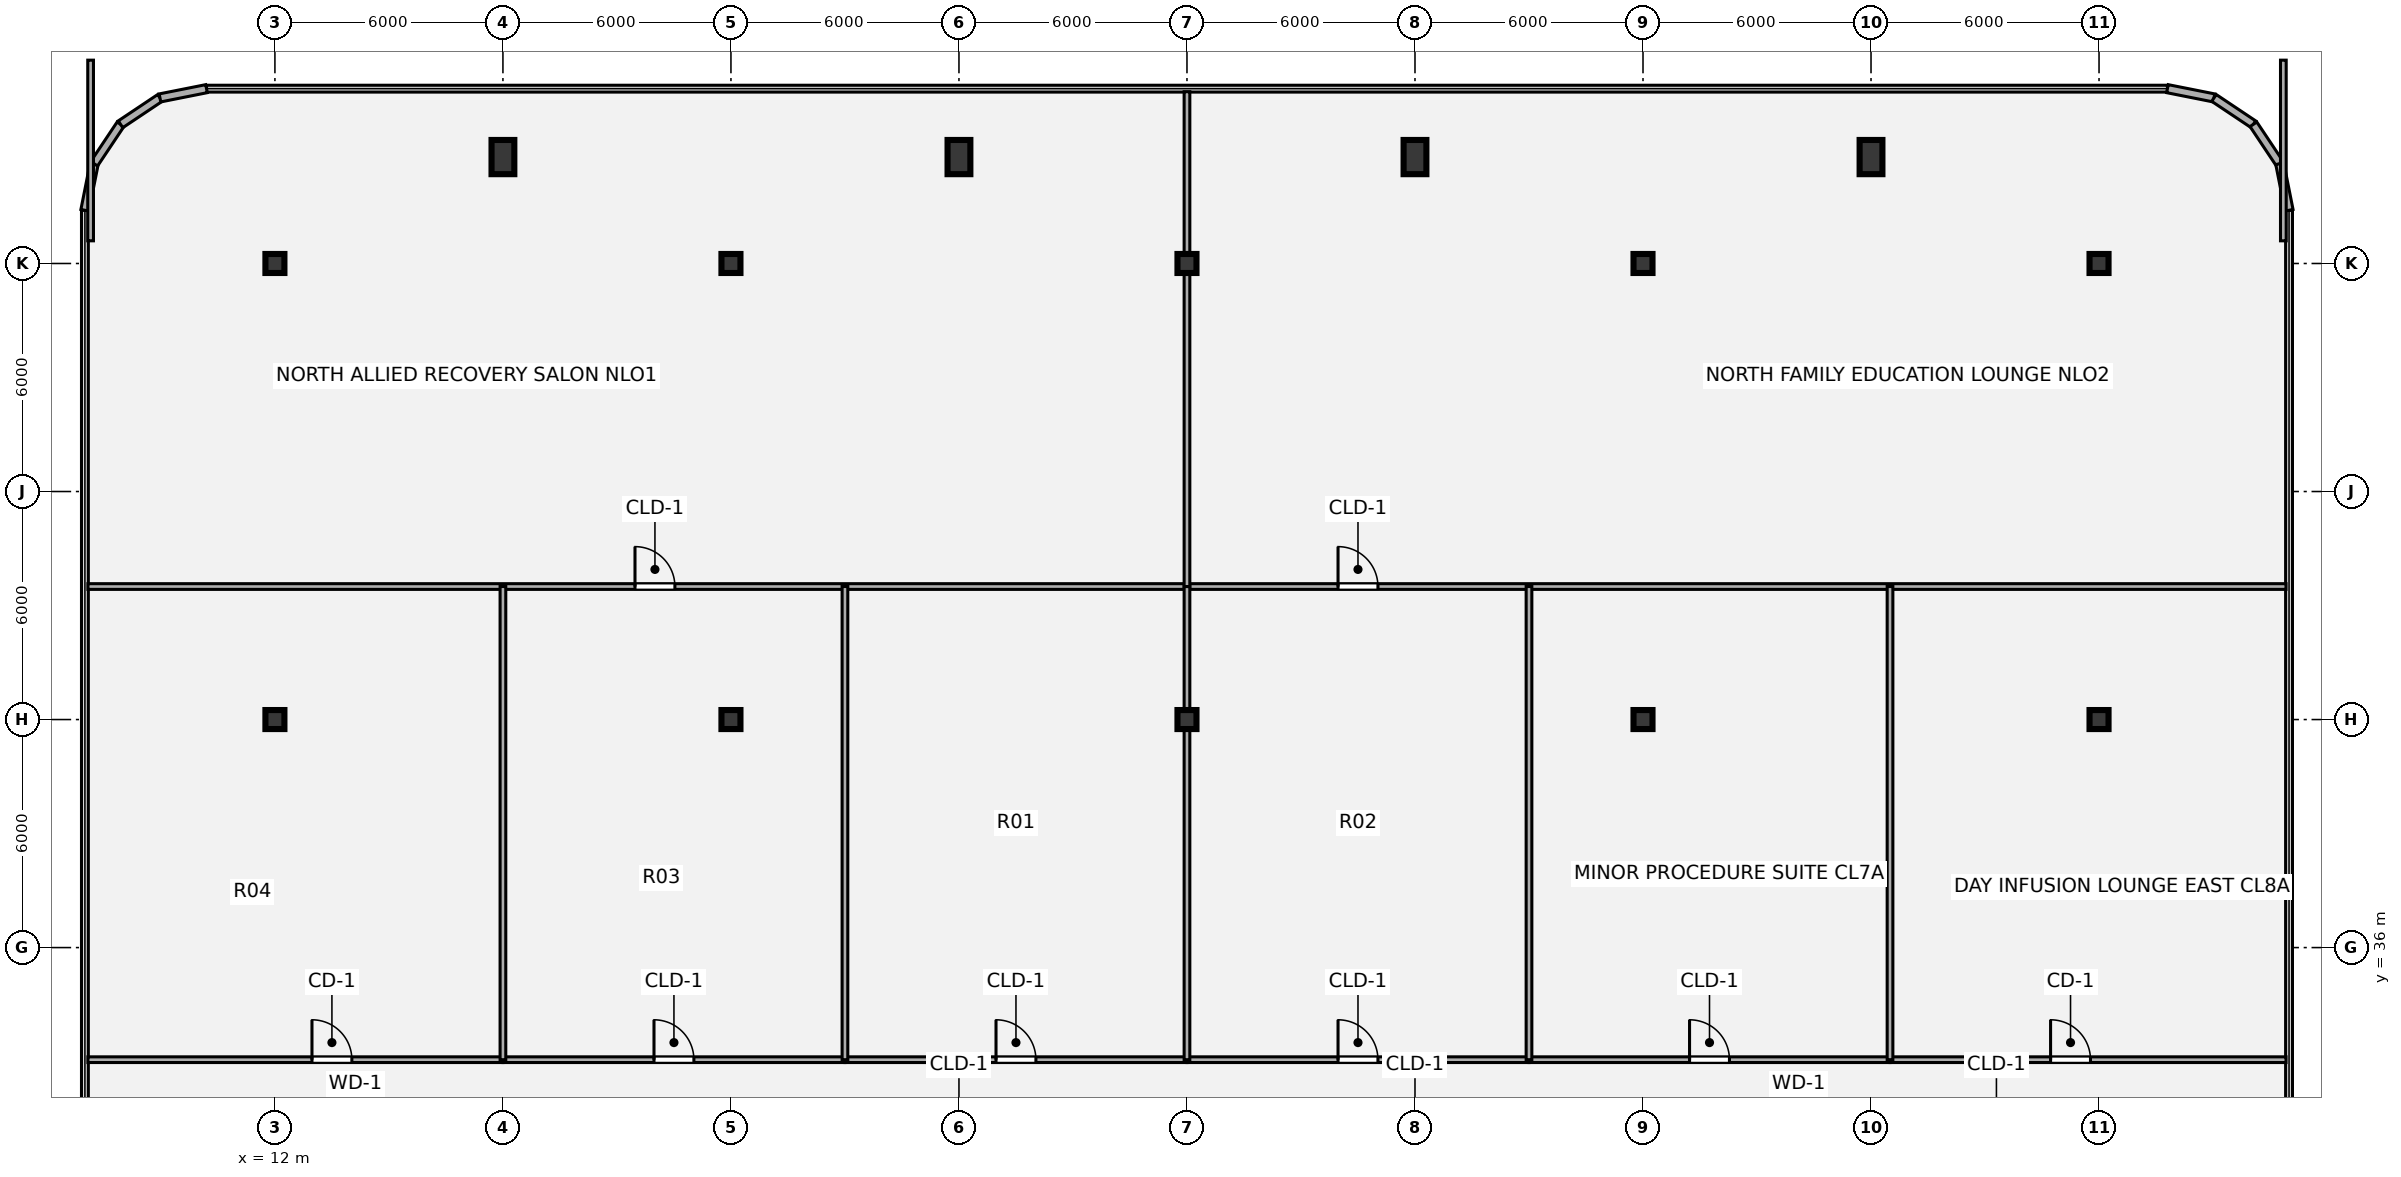
"""IFC4 building model, lengths in metres.
Left out: names, types, materials, properties, quantities, classifications, styles, units other than length and angle.
Written with IfcOpenShell. Run it as: python <this file> out.ifc"""

import sys

from ifc_helpers import new_model, si_unit, direction, frame, frame_2d, origin, origin_2d, place, context, subcontext, project, spatial, rectangle, i_section, extrude, source, transform, mapped, element, fill, save


model = new_model("IFC4")
c1 = context("Model", 3, precision=1e-05, world=origin(), true_north=direction((0.0, 1.0)))
c2 = subcontext(c1, "Body", "Model", "MODEL_VIEW")
j1 = project(units=[si_unit("LENGTHUNIT", "METRE"), si_unit("PLANEANGLEUNIT", "RADIAN")], contexts=[c1])
p1 = place(None, origin())
s1 = spatial("IfcSite", under=j1, at=p1, CompositionType="ELEMENT")
p2 = place(p1, origin())
s2 = spatial("IfcBuilding", under=s1, at=p2, CompositionType="ELEMENT")
p3 = place(p2, frame((0.0, 0.0, 5.4)))
s3 = spatial("IfcBuildingStorey", under=s2, at=p3, CompositionType="ELEMENT", Elevation=5.4)
m1 = source(origin(), c2, "Body", "SweptSolid", [
    extrude(i_section(OverallWidth=0.5, OverallDepth=0.5, WebThickness=0.028, FlangeThickness=0.045, at=origin_2d()), origin(), (0.0, 0.0, 1.0), 4.32),
])
for number, where, z_axis, x_axis in (
    (1, (12.0, 42.0, 0.0), (0.0, 0.0, 1.0), (1.0, 0.0, 0.0)),
    (2, (24.0, 42.0, 0.0), (0.0, 0.0, 1.0), (1.0, 0.0, 0.0)),
    (3, (36.0, 42.0, 0.0), (0.0, 0.0, 1.0), (1.0, 0.0, 0.0)),
    (4, (48.0, 42.0, 0.0), (0.0, 0.0, 1.0), (1.0, 0.0, 0.0)),
    (5, (60.0, 42.0, 0.0), (0.0, 0.0, 1.0), (1.0, 0.0, 0.0)),
    (6, (12.0, 54.0, 0.0), (0.0, 0.0, 1.0), (1.0, 0.0, 0.0)),
    (7, (24.0, 54.0, 0.0), (0.0, 0.0, 1.0), (1.0, 0.0, 0.0)),
    (8, (36.0, 54.0, 0.0), (0.0, 0.0, 1.0), (1.0, 0.0, 0.0)),
    (9, (48.0, 54.0, 0.0), (0.0, 0.0, 1.0), (1.0, 0.0, 0.0)),
    (10, (60.0, 54.0, 0.0), (0.0, 0.0, 1.0), (1.0, 0.0, 0.0)),
):
    element("IfcColumn", number, at=place(p3, frame(where, z_axis=z_axis, x_axis=x_axis)), inside=s3, PredefinedType="COLUMN", context=c2, shape_type="MappedRepresentation", body=[
        mapped(m1, transform((0.0, 0.0, 0.0), x_axis=(1.0, 0.0, 0.0), y_axis=(0.0, 1.0, 0.0), z_axis=(0.0, 0.0, 1.0), scale=1.0)),
    ])
m2 = source(origin(), c2, "Body", "SweptSolid", [
    extrude(rectangle(XDim=0.6, YDim=0.9, at=origin_2d()), origin(), (0.0, 0.0, 1.0), 4.32),
])
for number, where, z_axis, x_axis in (
    (11, (18.0, 56.8, 0.0), (0.0, 0.0, 1.0), (1.0, 0.0, 0.0)),
    (12, (30.0, 56.8, 0.0), (0.0, 0.0, 1.0), (1.0, 0.0, 0.0)),
    (13, (42.0, 56.8, 0.0), (0.0, 0.0, 1.0), (1.0, 0.0, 0.0)),
    (14, (54.0, 56.8, 0.0), (0.0, 0.0, 1.0), (1.0, 0.0, 0.0)),
):
    element("IfcColumn", number, at=place(p3, frame(where, z_axis=z_axis, x_axis=x_axis)), inside=s3, PredefinedType="PILASTER", context=c2, shape_type="MappedRepresentation", body=[
        mapped(m2, transform((0.0, 0.0, 0.0), x_axis=(1.0, 0.0, 0.0), y_axis=(0.0, 1.0, 0.0), z_axis=(0.0, 0.0, 1.0), scale=1.0)),
    ])
for number, where, z_axis, x_axis in (
    (15, (7.0, 55.4, 0.0), (0.0, 0.0, 1.0), (0.195, 0.981, 0.0)),
    (16, (7.244, 56.625, 0.0), (0.0, 0.0, 1.0), (0.556, 0.831, 0.0)),
    (17, (7.937, 57.663, 0.0), (0.0, 0.0, 1.0), (0.831, 0.556, 0.0)),
    (18, (8.975, 58.356, 0.0), (0.0, 0.0, 1.0), (0.981, 0.195, 0.0)),
    (19, (61.8, 58.6, 0.0), (0.0, 0.0, 1.0), (0.981, -0.195, 0.0)),
    (20, (63.025, 58.356, 0.0), (0.0, 0.0, 1.0), (0.831, -0.556, 0.0)),
    (21, (64.063, 57.663, 0.0), (0.0, 0.0, 1.0), (0.556, -0.831, 0.0)),
    (22, (64.756, 56.625, 0.0), (0.0, 0.0, 1.0), (0.195, -0.981, 0.0)),
):
    element("IfcWall", number, at=place(p3, frame(where, z_axis=z_axis, x_axis=x_axis)), inside=s3, PredefinedType="SOLIDWALL", context=c2, shape_type="SweptSolid", body=[
        extrude(rectangle(XDim=1.249, YDim=0.215, at=frame_2d((0.624, 0.0))), origin(), (0.0, 0.0, 1.0), 4.04),
    ])
p4 = place(p3, frame((7.08, 33.05, 0.0), z_axis=(0.0, 0.0, 1.0), x_axis=(1.0, 0.0, 0.0)))
e23 = element("IfcWall", 23, at=p4, inside=s3, PredefinedType="PARTITIONING", context=c2, shape_type="SweptSolid", body=[
    extrude(rectangle(XDim=10.92, YDim=0.15, at=frame_2d((5.46, 0.0))), origin(), (0.0, 0.0, 1.0), 4.01),
])
p5 = place(p4, frame((5.895, 0.0, 0.0)))
e24 = element("IfcOpeningElement", 24, at=p5, cuts=e23, PredefinedType="OPENING", context=c2, shape_type="SweptSolid", body=[
    extrude(rectangle(XDim=1.05, YDim=2.1, at=origin_2d()), frame((0.525, 0.085, 1.05), z_axis=(0.0, -1.0, 0.0), x_axis=(1.0, 0.0, 0.0)), (0.0, 0.0, 1.0), 0.17),
])
p6 = place(p3, frame((18.0, 33.05, 0.0), z_axis=(0.0, 0.0, 1.0), x_axis=(1.0, 0.0, 0.0)))
e25 = element("IfcWall", 25, at=p6, inside=s3, PredefinedType="PARTITIONING", context=c2, shape_type="SweptSolid", body=[
    extrude(rectangle(XDim=9.0, YDim=0.15, at=frame_2d((4.5, 0.0))), origin(), (0.0, 0.0, 1.0), 4.01),
])
p7 = place(p6, frame((3.975, 0.0, 0.0)))
e26 = element("IfcOpeningElement", 26, at=p7, cuts=e25, PredefinedType="OPENING", context=c2, shape_type="SweptSolid", body=[
    extrude(rectangle(XDim=1.05, YDim=2.1, at=origin_2d()), frame((0.525, 0.085, 1.05), z_axis=(0.0, -1.0, 0.0), x_axis=(1.0, 0.0, 0.0)), (0.0, 0.0, 1.0), 0.17),
])
p8 = place(p3, frame((27.0, 33.05, 0.0), z_axis=(0.0, 0.0, 1.0), x_axis=(1.0, 0.0, 0.0)))
e27 = element("IfcWall", 27, at=p8, inside=s3, PredefinedType="PARTITIONING", context=c2, shape_type="SweptSolid", body=[
    extrude(rectangle(XDim=9.0, YDim=0.15, at=frame_2d((4.5, 0.0))), origin(), (0.0, 0.0, 1.0), 4.01),
])
p9 = place(p8, frame((3.975, 0.0, 0.0)))
e28 = element("IfcOpeningElement", 28, at=p9, cuts=e27, PredefinedType="OPENING", context=c2, shape_type="SweptSolid", body=[
    extrude(rectangle(XDim=1.05, YDim=2.1, at=origin_2d()), frame((0.525, 0.085, 1.05), z_axis=(0.0, -1.0, 0.0), x_axis=(1.0, 0.0, 0.0)), (0.0, 0.0, 1.0), 0.17),
])
p10 = place(p3, frame((36.0, 33.05, 0.0), z_axis=(0.0, 0.0, 1.0), x_axis=(1.0, 0.0, 0.0)))
e29 = element("IfcWall", 29, at=p10, inside=s3, PredefinedType="PARTITIONING", context=c2, shape_type="SweptSolid", body=[
    extrude(rectangle(XDim=9.0, YDim=0.15, at=frame_2d((4.5, 0.0))), origin(), (0.0, 0.0, 1.0), 4.01),
])
p11 = place(p10, frame((3.975, 0.0, 0.0)))
e30 = element("IfcOpeningElement", 30, at=p11, cuts=e29, PredefinedType="OPENING", context=c2, shape_type="SweptSolid", body=[
    extrude(rectangle(XDim=1.05, YDim=2.1, at=origin_2d()), frame((0.525, 0.085, 1.05), z_axis=(0.0, -1.0, 0.0), x_axis=(1.0, 0.0, 0.0)), (0.0, 0.0, 1.0), 0.17),
])
p12 = place(p3, frame((45.0, 33.05, 0.0), z_axis=(0.0, 0.0, 1.0), x_axis=(1.0, 0.0, 0.0)))
e31 = element("IfcWall", 31, at=p12, inside=s3, PredefinedType="PARTITIONING", context=c2, shape_type="SweptSolid", body=[
    extrude(rectangle(XDim=9.5, YDim=0.15, at=frame_2d((4.75, 0.0))), origin(), (0.0, 0.0, 1.0), 4.01),
])
p13 = place(p12, frame((4.225, 0.0, 0.0)))
e32 = element("IfcOpeningElement", 32, at=p13, cuts=e31, PredefinedType="OPENING", context=c2, shape_type="SweptSolid", body=[
    extrude(rectangle(XDim=1.05, YDim=2.1, at=origin_2d()), frame((0.525, 0.085, 1.05), z_axis=(0.0, -1.0, 0.0), x_axis=(1.0, 0.0, 0.0)), (0.0, 0.0, 1.0), 0.17),
])
p14 = place(p3, frame((54.5, 33.05, 0.0), z_axis=(0.0, 0.0, 1.0), x_axis=(1.0, 0.0, 0.0)))
e33 = element("IfcWall", 33, at=p14, inside=s3, PredefinedType="PARTITIONING", context=c2, shape_type="SweptSolid", body=[
    extrude(rectangle(XDim=10.42, YDim=0.15, at=frame_2d((5.21, 0.0))), origin(), (0.0, 0.0, 1.0), 4.01),
])
p15 = place(p14, frame((4.225, 0.0, 0.0)))
e34 = element("IfcOpeningElement", 34, at=p15, cuts=e33, PredefinedType="OPENING", context=c2, shape_type="SweptSolid", body=[
    extrude(rectangle(XDim=1.05, YDim=2.1, at=origin_2d()), frame((0.525, 0.085, 1.05), z_axis=(0.0, -1.0, 0.0), x_axis=(1.0, 0.0, 0.0)), (0.0, 0.0, 1.0), 0.17),
])
p16 = place(p3, frame((7.08, 45.5, 0.0), z_axis=(0.0, 0.0, 1.0), x_axis=(1.0, 0.0, 0.0)))
e35 = element("IfcWall", 35, at=p16, inside=s3, PredefinedType="PARTITIONING", context=c2, shape_type="SweptSolid", body=[
    extrude(rectangle(XDim=28.92, YDim=0.15, at=frame_2d((14.46, 0.0))), origin(), (0.0, 0.0, 1.0), 4.01),
])
p17 = place(p16, frame((14.395, 0.0, 0.0)))
e36 = element("IfcOpeningElement", 36, at=p17, cuts=e35, PredefinedType="OPENING", context=c2, shape_type="SweptSolid", body=[
    extrude(rectangle(XDim=1.05, YDim=2.1, at=origin_2d()), frame((0.525, 0.085, 1.05), z_axis=(0.0, -1.0, 0.0), x_axis=(1.0, 0.0, 0.0)), (0.0, 0.0, 1.0), 0.17),
])
p18 = place(p3, frame((36.0, 45.5, 0.0), z_axis=(0.0, 0.0, 1.0), x_axis=(1.0, 0.0, 0.0)))
e37 = element("IfcWall", 37, at=p18, inside=s3, PredefinedType="PARTITIONING", context=c2, shape_type="SweptSolid", body=[
    extrude(rectangle(XDim=28.92, YDim=0.15, at=frame_2d((14.46, 0.0))), origin(), (0.0, 0.0, 1.0), 4.01),
])
p19 = place(p18, frame((3.975, 0.0, 0.0)))
e38 = element("IfcOpeningElement", 38, at=p19, cuts=e37, PredefinedType="OPENING", context=c2, shape_type="SweptSolid", body=[
    extrude(rectangle(XDim=1.05, YDim=2.1, at=origin_2d()), frame((0.525, 0.085, 1.05), z_axis=(0.0, -1.0, 0.0), x_axis=(1.0, 0.0, 0.0)), (0.0, 0.0, 1.0), 0.17),
])
p20 = place(p3, frame((7.15, 54.596, 0.0), z_axis=(0.0, 0.0, 1.0), x_axis=(0.0, 1.0, 0.0)))
e39 = element("IfcWall", 39, at=p20, inside=s3, PredefinedType="PARTITIONING", context=c2, shape_type="SweptSolid", body=[
    extrude(rectangle(XDim=4.754, YDim=0.15, at=frame_2d((2.377, 0.0))), origin(), (0.0, 0.0, 1.0), 4.01),
])
for number, where, z_axis, x_axis in (
    (40, (18.0, 33.05, 0.0), (0.0, 0.0, 1.0), (0.0, 1.0, 0.0)),
    (41, (27.0, 33.05, 0.0), (0.0, 0.0, 1.0), (0.0, 1.0, 0.0)),
):
    element("IfcWall", number, at=place(p3, frame(where, z_axis=z_axis, x_axis=x_axis)), inside=s3, PredefinedType="PARTITIONING", context=c2, shape_type="SweptSolid", body=[
        extrude(rectangle(XDim=12.45, YDim=0.15, at=frame_2d((6.225, 0.0))), origin(), (0.0, 0.0, 1.0), 3.666),
    ])
p21 = place(p3, frame((36.0, 33.05, 0.0), z_axis=(0.0, 0.0, 1.0), x_axis=(0.0, 1.0, 0.0)))
e42 = element("IfcWall", 42, at=p21, inside=s3, PredefinedType="PARTITIONING", context=c2, shape_type="SweptSolid", body=[
    extrude(rectangle(XDim=12.45, YDim=0.15, at=frame_2d((6.225, 0.0))), origin(), (0.0, 0.0, 1.0), 3.225),
])
p22 = place(p3, frame((36.0, 45.5, 0.0), z_axis=(0.0, 0.0, 1.0), x_axis=(0.0, 1.0, 0.0)))
e43 = element("IfcWall", 43, at=p22, inside=s3, PredefinedType="PARTITIONING", context=c2, shape_type="SweptSolid", body=[
    extrude(rectangle(XDim=13.02, YDim=0.15, at=frame_2d((6.51, 0.0))), origin(), (0.0, 0.0, 1.0), 3.225),
])
for number, where, z_axis, x_axis in (
    (44, (45.0, 33.05, 0.0), (0.0, 0.0, 1.0), (0.0, 1.0, 0.0)),
    (45, (54.5, 33.05, 0.0), (0.0, 0.0, 1.0), (0.0, 1.0, 0.0)),
):
    element("IfcWall", number, at=place(p3, frame(where, z_axis=z_axis, x_axis=x_axis)), inside=s3, PredefinedType="PARTITIONING", context=c2, shape_type="SweptSolid", body=[
        extrude(rectangle(XDim=12.45, YDim=0.15, at=frame_2d((6.225, 0.0))), origin(), (0.0, 0.0, 1.0), 3.666),
    ])
p23 = place(p3, frame((64.85, 54.596, 0.0), z_axis=(0.0, 0.0, 1.0), x_axis=(0.0, 1.0, 0.0)))
e46 = element("IfcWall", 46, at=p23, inside=s3, PredefinedType="PARTITIONING", context=c2, shape_type="SweptSolid", body=[
    extrude(rectangle(XDim=4.754, YDim=0.15, at=frame_2d((2.377, 0.0))), origin(), (0.0, 0.0, 1.0), 4.01),
])
m3 = source(origin(), c2, "Body", "SweptSolid", [
    extrude(rectangle(XDim=1.05, YDim=2.1, at=origin_2d()), frame((0.525, 0.025, 1.05), z_axis=(0.0, -1.0, 0.0), x_axis=(1.0, 0.0, 0.0)), (0.0, 0.0, 1.0), 0.05),
])
p24 = place(p5, origin())
e47 = element("IfcDoor", 47, at=p24, inside=s3, OperationType="SINGLE_SWING_LEFT", PredefinedType="DOOR", context=c2, shape_type="MappedRepresentation", body=[
    mapped(m3, transform((0.0, 0.0, 0.0), x_axis=(1.0, 0.0, 0.0), y_axis=(0.0, 1.0, 0.0), z_axis=(0.0, 0.0, 1.0), scale=1.0)),
])
fill(e24, e47)
m4 = source(origin(), c2, "Body", "SweptSolid", [
    extrude(rectangle(XDim=1.05, YDim=2.1, at=origin_2d()), frame((0.525, 0.025, 1.05), z_axis=(0.0, -1.0, 0.0), x_axis=(1.0, 0.0, 0.0)), (0.0, 0.0, 1.0), 0.05),
])
p25 = place(p7, origin())
e48 = element("IfcDoor", 48, at=p25, inside=s3, OperationType="SINGLE_SWING_LEFT", PredefinedType="DOOR", context=c2, shape_type="MappedRepresentation", body=[
    mapped(m4, transform((0.0, 0.0, 0.0), x_axis=(1.0, 0.0, 0.0), y_axis=(0.0, 1.0, 0.0), z_axis=(0.0, 0.0, 1.0), scale=1.0)),
])
fill(e26, e48)
p26 = place(p9, origin())
e49 = element("IfcDoor", 49, at=p26, inside=s3, OperationType="SINGLE_SWING_LEFT", PredefinedType="DOOR", context=c2, shape_type="MappedRepresentation", body=[
    mapped(m4, transform((0.0, 0.0, 0.0), x_axis=(1.0, 0.0, 0.0), y_axis=(0.0, 1.0, 0.0), z_axis=(0.0, 0.0, 1.0), scale=1.0)),
])
fill(e28, e49)
p27 = place(p11, origin())
e50 = element("IfcDoor", 50, at=p27, inside=s3, OperationType="SINGLE_SWING_LEFT", PredefinedType="DOOR", context=c2, shape_type="MappedRepresentation", body=[
    mapped(m4, transform((0.0, 0.0, 0.0), x_axis=(1.0, 0.0, 0.0), y_axis=(0.0, 1.0, 0.0), z_axis=(0.0, 0.0, 1.0), scale=1.0)),
])
fill(e30, e50)
p28 = place(p13, origin())
e51 = element("IfcDoor", 51, at=p28, inside=s3, OperationType="SINGLE_SWING_LEFT", PredefinedType="DOOR", context=c2, shape_type="MappedRepresentation", body=[
    mapped(m4, transform((0.0, 0.0, 0.0), x_axis=(1.0, 0.0, 0.0), y_axis=(0.0, 1.0, 0.0), z_axis=(0.0, 0.0, 1.0), scale=1.0)),
])
fill(e32, e51)
p29 = place(p15, origin())
e52 = element("IfcDoor", 52, at=p29, inside=s3, OperationType="SINGLE_SWING_LEFT", PredefinedType="DOOR", context=c2, shape_type="MappedRepresentation", body=[
    mapped(m3, transform((0.0, 0.0, 0.0), x_axis=(1.0, 0.0, 0.0), y_axis=(0.0, 1.0, 0.0), z_axis=(0.0, 0.0, 1.0), scale=1.0)),
])
fill(e34, e52)
p30 = place(p17, origin())
e53 = element("IfcDoor", 53, at=p30, inside=s3, OperationType="SINGLE_SWING_LEFT", PredefinedType="DOOR", context=c2, shape_type="MappedRepresentation", body=[
    mapped(m4, transform((0.0, 0.0, 0.0), x_axis=(1.0, 0.0, 0.0), y_axis=(0.0, 1.0, 0.0), z_axis=(0.0, 0.0, 1.0), scale=1.0)),
])
fill(e36, e53)
p31 = place(p19, origin())
e54 = element("IfcDoor", 54, at=p31, inside=s3, OperationType="SINGLE_SWING_LEFT", PredefinedType="DOOR", context=c2, shape_type="MappedRepresentation", body=[
    mapped(m4, transform((0.0, 0.0, 0.0), x_axis=(1.0, 0.0, 0.0), y_axis=(0.0, 1.0, 0.0), z_axis=(0.0, 0.0, 1.0), scale=1.0)),
])
fill(e38, e54)
save(model, sys.argv[1])
